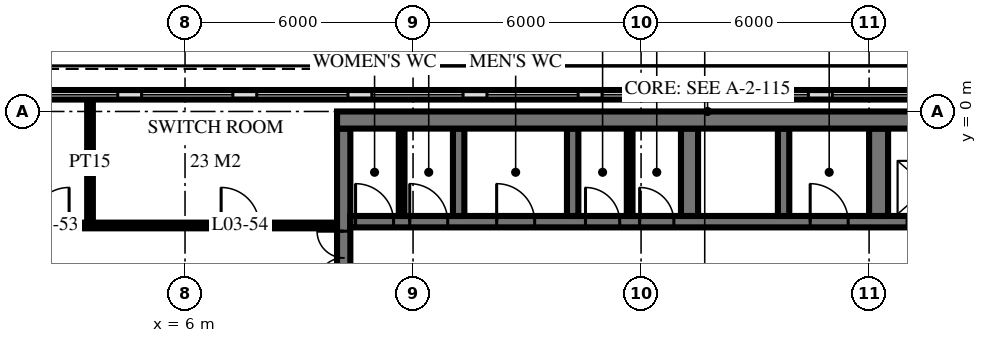
"""IFC4 building model, lengths in metres.
Left out: names, types, materials, properties, quantities, classifications, styles, units other than length and angle.
Written with IfcOpenShell. Run it as: python <this file> out.ifc"""

import sys

from ifc_helpers import new_model, si_unit, direction, frame, frame_2d, origin, place, context, subcontext, project, spatial, rectangle, extrude, element, fill, save


model = new_model("IFC4")
c1 = context("Model", 3, precision=1e-05, world=origin(), true_north=direction((0.0, 1.0)))
c2 = subcontext(c1, "Body", "Model", "MODEL_VIEW")
j1 = project(units=[si_unit("LENGTHUNIT", "METRE"), si_unit("PLANEANGLEUNIT", "RADIAN")], contexts=[c1])
p1 = place(None, origin())
s1 = spatial("IfcSite", under=j1, at=p1, CompositionType="ELEMENT")
p2 = place(p1, origin())
s2 = spatial("IfcBuilding", under=s1, at=p2, CompositionType="ELEMENT")
p3 = place(p2, frame((0.0, 0.0, 18.0)))
s3 = spatial("IfcBuildingStorey", under=s2, at=p3, CompositionType="ELEMENT", Elevation=18.0)
p4 = place(p3, frame((10.0, -0.225, 0.0), z_axis=(0.0, 0.0, 1.0), x_axis=(1.0, 0.0, 0.0)))
e1 = element("IfcWall", 1, at=p4, inside=s3, PredefinedType="SHEAR", context=c2, shape_type="SweptSolid", body=[
    extrude(rectangle(XDim=19.5, YDim=0.45, at=frame_2d((9.75, 0.0))), origin(), (0.0, 0.0, 1.0), 6.0),
])
p5 = place(p3, frame((10.175, -14.55, 0.0), z_axis=(0.0, 0.0, 1.0), x_axis=(0.0, 1.0, 0.0)))
e2 = element("IfcWall", 2, at=p5, inside=s3, PredefinedType="SHEAR", context=c2, shape_type="SweptSolid", body=[
    extrude(rectangle(XDim=14.1, YDim=0.35, at=frame_2d((7.05, 0.0))), origin(), (0.0, 0.0, 1.0), 6.0),
])
p6 = place(p5, frame((8.4, 0.0, 0.0)))
e3 = element("IfcOpeningElement", 3, at=p6, cuts=e2, PredefinedType="OPENING", context=c2, shape_type="SweptSolid", body=[
    extrude(rectangle(XDim=1.4, YDim=2.4, at=frame_2d((0.7, 1.2))), frame((0.0, 0.185, 0.0), z_axis=(0.0, -1.0, 0.0), x_axis=(1.0, 0.0, 0.0)), (0.0, 0.0, 1.0), 0.37),
])
p7 = place(p5, frame((10.0, 0.0, 0.0)))
e4 = element("IfcOpeningElement", 4, at=p7, cuts=e2, PredefinedType="OPENING", context=c2, shape_type="SweptSolid", body=[
    extrude(rectangle(XDim=1.4, YDim=2.4, at=frame_2d((0.7, 1.2))), frame((0.0, 0.185, 0.0), z_axis=(0.0, -1.0, 0.0), x_axis=(1.0, 0.0, 0.0)), (0.0, 0.0, 1.0), 0.37),
])
p8 = place(p5, frame((4.0, 0.0, 0.0)))
e5 = element("IfcOpeningElement", 5, at=p8, cuts=e2, PredefinedType="OPENING", context=c2, shape_type="SweptSolid", body=[
    extrude(rectangle(XDim=1.2, YDim=2.1, at=frame_2d((0.6, 1.05))), frame((0.0, 0.185, 0.0), z_axis=(0.0, -1.0, 0.0), x_axis=(1.0, 0.0, 0.0)), (0.0, 0.0, 1.0), 0.37),
])
p9 = place(p3, frame((10.35, -2.9, 0.0), z_axis=(0.0, 0.0, 1.0), x_axis=(1.0, 0.0, 0.0)))
e6 = element("IfcWall", 6, at=p9, inside=s3, PredefinedType="SHEAR", context=c2, shape_type="SweptSolid", body=[
    extrude(rectangle(XDim=18.7, YDim=0.3, at=frame_2d((9.35, 0.0))), origin(), (0.0, 0.0, 1.0), 6.0),
])
p10 = place(p9, frame((14.65, 0.0, 0.0)))
e7 = element("IfcOpeningElement", 7, at=p10, cuts=e6, PredefinedType="OPENING", context=c2, shape_type="SweptSolid", body=[
    extrude(rectangle(XDim=1.1, YDim=2.1, at=frame_2d((0.55, 1.05))), frame((0.0, 0.16, 0.0), z_axis=(0.0, -1.0, 0.0), x_axis=(1.0, 0.0, 0.0)), (0.0, 0.0, 1.0), 0.32),
])
p11 = place(p9, frame((17.05, 0.0, 0.0)))
e8 = element("IfcOpeningElement", 8, at=p11, cuts=e6, PredefinedType="OPENING", context=c2, shape_type="SweptSolid", body=[
    extrude(rectangle(XDim=1.1, YDim=2.1, at=frame_2d((0.55, 1.05))), frame((0.0, 0.16, 0.0), z_axis=(0.0, -1.0, 0.0), x_axis=(1.0, 0.0, 0.0)), (0.0, 0.0, 1.0), 0.32),
])
p12 = place(p9, frame((6.188, 0.0, 0.0)))
e9 = element("IfcOpeningElement", 9, at=p12, cuts=e6, PredefinedType="OPENING", context=c2, shape_type="SweptSolid", body=[
    extrude(rectangle(XDim=0.9, YDim=2.1, at=frame_2d((0.45, 1.05))), frame((0.0, 0.16, 0.0), z_axis=(0.0, -1.0, 0.0), x_axis=(1.0, 0.0, 0.0)), (0.0, 0.0, 1.0), 0.32),
])
p13 = place(p9, frame((7.613, 0.0, 0.0)))
e10 = element("IfcOpeningElement", 10, at=p13, cuts=e6, PredefinedType="OPENING", context=c2, shape_type="SweptSolid", body=[
    extrude(rectangle(XDim=0.9, YDim=2.1, at=frame_2d((0.45, 1.05))), frame((0.0, 0.16, 0.0), z_axis=(0.0, -1.0, 0.0), x_axis=(1.0, 0.0, 0.0)), (0.0, 0.0, 1.0), 0.32),
])
p14 = place(p9, frame((0.137, 0.0, 0.0)))
e11 = element("IfcOpeningElement", 11, at=p14, cuts=e6, PredefinedType="OPENING", context=c2, shape_type="SweptSolid", body=[
    extrude(rectangle(XDim=1.0, YDim=2.1, at=frame_2d((0.5, 1.05))), frame((0.0, 0.16, 0.0), z_axis=(0.0, -1.0, 0.0), x_axis=(1.0, 0.0, 0.0)), (0.0, 0.0, 1.0), 0.32),
])
p15 = place(p9, frame((1.562, 0.0, 0.0)))
e12 = element("IfcOpeningElement", 12, at=p15, cuts=e6, PredefinedType="OPENING", context=c2, shape_type="SweptSolid", body=[
    extrude(rectangle(XDim=1.0, YDim=2.1, at=frame_2d((0.5, 1.05))), frame((0.0, 0.16, 0.0), z_axis=(0.0, -1.0, 0.0), x_axis=(1.0, 0.0, 0.0)), (0.0, 0.0, 1.0), 0.32),
])
p16 = place(p9, frame((3.85, 0.0, 0.0)))
e13 = element("IfcOpeningElement", 13, at=p16, cuts=e6, PredefinedType="OPENING", context=c2, shape_type="SweptSolid", body=[
    extrude(rectangle(XDim=1.0, YDim=2.1, at=frame_2d((0.5, 1.05))), frame((0.0, 0.16, 0.0), z_axis=(0.0, -1.0, 0.0), x_axis=(1.0, 0.0, 0.0)), (0.0, 0.0, 1.0), 0.32),
])
p17 = place(p9, frame((12.1, 0.0, 0.0)))
e14 = element("IfcOpeningElement", 14, at=p17, cuts=e6, PredefinedType="OPENING", context=c2, shape_type="SweptSolid", body=[
    extrude(rectangle(XDim=1.0, YDim=2.1, at=frame_2d((0.5, 1.05))), frame((0.0, 0.16, 0.0), z_axis=(0.0, -1.0, 0.0), x_axis=(1.0, 0.0, 0.0)), (0.0, 0.0, 1.0), 0.32),
])
for number, where, z_axis, x_axis in (
    (15, (13.2, -2.75, 0.0), (0.0, 0.0, 1.0), (0.0, 1.0, 0.0)),
    (16, (16.2, -2.75, 0.0), (0.0, 0.0, 1.0), (0.0, 1.0, 0.0)),
):
    element("IfcWall", number, at=place(p3, frame(where, z_axis=z_axis, x_axis=x_axis)), inside=s3, PredefinedType="SHEAR", context=c2, shape_type="SweptSolid", body=[
        extrude(rectangle(XDim=2.3, YDim=0.3, at=frame_2d((1.15, 0.0))), origin(), (0.0, 0.0, 1.0), 6.0),
    ])
p18 = place(p3, frame((19.275, -2.75, 0.0), z_axis=(0.0, 0.0, 1.0), x_axis=(0.0, 1.0, 0.0)))
e17 = element("IfcWall", 17, at=p18, inside=s3, PredefinedType="SHEAR", context=c2, shape_type="SweptSolid", body=[
    extrude(rectangle(XDim=2.3, YDim=0.45, at=frame_2d((1.15, 0.0))), origin(), (0.0, 0.0, 1.0), 6.0),
])
p19 = place(p3, frame((21.75, -2.75, 0.0), z_axis=(0.0, 0.0, 1.0), x_axis=(0.0, 1.0, 0.0)))
e18 = element("IfcWall", 18, at=p19, inside=s3, PredefinedType="SHEAR", context=c2, shape_type="SweptSolid", body=[
    extrude(rectangle(XDim=2.3, YDim=0.3, at=frame_2d((1.15, 0.0))), origin(), (0.0, 0.0, 1.0), 6.0),
])
p20 = place(p3, frame((24.25, -2.75, 0.0), z_axis=(0.0, 0.0, 1.0), x_axis=(0.0, 1.0, 0.0)))
e19 = element("IfcWall", 19, at=p20, inside=s3, PredefinedType="SHEAR", context=c2, shape_type="SweptSolid", body=[
    extrude(rectangle(XDim=2.3, YDim=0.5, at=frame_2d((1.15, 0.0))), origin(), (0.0, 0.0, 1.0), 6.0),
])
p21 = place(p3, frame((28.713, 0.439, 0.0), z_axis=(0.0, 0.0, 1.0), x_axis=(-1.0, 0.0, 0.0)))
e20 = element("IfcWall", 20, at=p21, inside=s3, PredefinedType="SOLIDWALL", context=c2, shape_type="SweptSolid", body=[
    extrude(rectangle(XDim=57.426, YDim=0.25, at=frame_2d((28.713, 0.0))), origin(), (0.0, 0.0, 1.0), 5.72),
])
p22 = place(p21, frame((0.252, 0.0, 0.858)))
e21 = element("IfcOpeningElement", 21, at=p22, cuts=e20, PredefinedType="OPENING", context=c2, shape_type="SweptSolid", body=[
    extrude(rectangle(XDim=2.4, YDim=3.6, at=frame_2d((1.2, 1.8))), frame((0.0, 0.135, 0.0), z_axis=(0.0, -1.0, 0.0), x_axis=(1.0, 0.0, 0.0)), (0.0, 0.0, 1.0), 0.27),
])
p23 = place(p21, frame((3.281, 0.0, 0.858)))
e22 = element("IfcOpeningElement", 22, at=p23, cuts=e20, PredefinedType="OPENING", context=c2, shape_type="SweptSolid", body=[
    extrude(rectangle(XDim=2.4, YDim=3.6, at=frame_2d((1.2, 1.8))), frame((0.0, 0.135, 0.0), z_axis=(0.0, -1.0, 0.0), x_axis=(1.0, 0.0, 0.0)), (0.0, 0.0, 1.0), 0.27),
])
p24 = place(p21, frame((6.31, 0.0, 0.858)))
e23 = element("IfcOpeningElement", 23, at=p24, cuts=e20, PredefinedType="OPENING", context=c2, shape_type="SweptSolid", body=[
    extrude(rectangle(XDim=2.4, YDim=3.6, at=frame_2d((1.2, 1.8))), frame((0.0, 0.135, 0.0), z_axis=(0.0, -1.0, 0.0), x_axis=(1.0, 0.0, 0.0)), (0.0, 0.0, 1.0), 0.27),
])
p25 = place(p21, frame((9.339, 0.0, 0.858)))
e24 = element("IfcOpeningElement", 24, at=p25, cuts=e20, PredefinedType="OPENING", context=c2, shape_type="SweptSolid", body=[
    extrude(rectangle(XDim=2.4, YDim=3.6, at=frame_2d((1.2, 1.8))), frame((0.0, 0.135, 0.0), z_axis=(0.0, -1.0, 0.0), x_axis=(1.0, 0.0, 0.0)), (0.0, 0.0, 1.0), 0.27),
])
p26 = place(p21, frame((12.368, 0.0, 0.858)))
e25 = element("IfcOpeningElement", 25, at=p26, cuts=e20, PredefinedType="OPENING", context=c2, shape_type="SweptSolid", body=[
    extrude(rectangle(XDim=2.4, YDim=3.6, at=frame_2d((1.2, 1.8))), frame((0.0, 0.135, 0.0), z_axis=(0.0, -1.0, 0.0), x_axis=(1.0, 0.0, 0.0)), (0.0, 0.0, 1.0), 0.27),
])
p27 = place(p21, frame((15.397, 0.0, 0.858)))
e26 = element("IfcOpeningElement", 26, at=p27, cuts=e20, PredefinedType="OPENING", context=c2, shape_type="SweptSolid", body=[
    extrude(rectangle(XDim=2.4, YDim=3.6, at=frame_2d((1.2, 1.8))), frame((0.0, 0.135, 0.0), z_axis=(0.0, -1.0, 0.0), x_axis=(1.0, 0.0, 0.0)), (0.0, 0.0, 1.0), 0.27),
])
p28 = place(p21, frame((18.426, 0.0, 0.858)))
e27 = element("IfcOpeningElement", 27, at=p28, cuts=e20, PredefinedType="OPENING", context=c2, shape_type="SweptSolid", body=[
    extrude(rectangle(XDim=2.4, YDim=3.6, at=frame_2d((1.2, 1.8))), frame((0.0, 0.135, 0.0), z_axis=(0.0, -1.0, 0.0), x_axis=(1.0, 0.0, 0.0)), (0.0, 0.0, 1.0), 0.27),
])
p29 = place(p21, frame((21.455, 0.0, 0.858)))
e28 = element("IfcOpeningElement", 28, at=p29, cuts=e20, PredefinedType="OPENING", context=c2, shape_type="SweptSolid", body=[
    extrude(rectangle(XDim=2.4, YDim=3.6, at=frame_2d((1.2, 1.8))), frame((0.0, 0.135, 0.0), z_axis=(0.0, -1.0, 0.0), x_axis=(1.0, 0.0, 0.0)), (0.0, 0.0, 1.0), 0.27),
])
p30 = place(p21, frame((24.484, 0.0, 0.858)))
e29 = element("IfcOpeningElement", 29, at=p30, cuts=e20, PredefinedType="OPENING", context=c2, shape_type="SweptSolid", body=[
    extrude(rectangle(XDim=2.4, YDim=3.6, at=frame_2d((1.2, 1.8))), frame((0.0, 0.135, 0.0), z_axis=(0.0, -1.0, 0.0), x_axis=(1.0, 0.0, 0.0)), (0.0, 0.0, 1.0), 0.27),
])
p31 = place(p21, frame((27.513, 0.0, 0.858)))
e30 = element("IfcOpeningElement", 30, at=p31, cuts=e20, PredefinedType="OPENING", context=c2, shape_type="SweptSolid", body=[
    extrude(rectangle(XDim=2.4, YDim=3.6, at=frame_2d((1.2, 1.8))), frame((0.0, 0.135, 0.0), z_axis=(0.0, -1.0, 0.0), x_axis=(1.0, 0.0, 0.0)), (0.0, 0.0, 1.0), 0.27),
])
p32 = place(p21, frame((30.542, 0.0, 0.858)))
e31 = element("IfcOpeningElement", 31, at=p32, cuts=e20, PredefinedType="OPENING", context=c2, shape_type="SweptSolid", body=[
    extrude(rectangle(XDim=2.4, YDim=3.6, at=frame_2d((1.2, 1.8))), frame((0.0, 0.135, 0.0), z_axis=(0.0, -1.0, 0.0), x_axis=(1.0, 0.0, 0.0)), (0.0, 0.0, 1.0), 0.27),
])
p33 = place(p21, frame((33.571, 0.0, 0.858)))
e32 = element("IfcOpeningElement", 32, at=p33, cuts=e20, PredefinedType="OPENING", context=c2, shape_type="SweptSolid", body=[
    extrude(rectangle(XDim=2.4, YDim=3.6, at=frame_2d((1.2, 1.8))), frame((0.0, 0.135, 0.0), z_axis=(0.0, -1.0, 0.0), x_axis=(1.0, 0.0, 0.0)), (0.0, 0.0, 1.0), 0.27),
])
p34 = place(p21, frame((36.6, 0.0, 0.858)))
e33 = element("IfcOpeningElement", 33, at=p34, cuts=e20, PredefinedType="OPENING", context=c2, shape_type="SweptSolid", body=[
    extrude(rectangle(XDim=2.4, YDim=3.6, at=frame_2d((1.2, 1.8))), frame((0.0, 0.135, 0.0), z_axis=(0.0, -1.0, 0.0), x_axis=(1.0, 0.0, 0.0)), (0.0, 0.0, 1.0), 0.27),
])
p35 = place(p21, frame((39.629, 0.0, 0.858)))
e34 = element("IfcOpeningElement", 34, at=p35, cuts=e20, PredefinedType="OPENING", context=c2, shape_type="SweptSolid", body=[
    extrude(rectangle(XDim=2.4, YDim=3.6, at=frame_2d((1.2, 1.8))), frame((0.0, 0.135, 0.0), z_axis=(0.0, -1.0, 0.0), x_axis=(1.0, 0.0, 0.0)), (0.0, 0.0, 1.0), 0.27),
])
p36 = place(p21, frame((42.658, 0.0, 0.858)))
e35 = element("IfcOpeningElement", 35, at=p36, cuts=e20, PredefinedType="OPENING", context=c2, shape_type="SweptSolid", body=[
    extrude(rectangle(XDim=2.4, YDim=3.6, at=frame_2d((1.2, 1.8))), frame((0.0, 0.135, 0.0), z_axis=(0.0, -1.0, 0.0), x_axis=(1.0, 0.0, 0.0)), (0.0, 0.0, 1.0), 0.27),
])
p37 = place(p21, frame((45.687, 0.0, 0.858)))
e36 = element("IfcOpeningElement", 36, at=p37, cuts=e20, PredefinedType="OPENING", context=c2, shape_type="SweptSolid", body=[
    extrude(rectangle(XDim=2.4, YDim=3.6, at=frame_2d((1.2, 1.8))), frame((0.0, 0.135, 0.0), z_axis=(0.0, -1.0, 0.0), x_axis=(1.0, 0.0, 0.0)), (0.0, 0.0, 1.0), 0.27),
])
p38 = place(p21, frame((48.716, 0.0, 0.858)))
e37 = element("IfcOpeningElement", 37, at=p38, cuts=e20, PredefinedType="OPENING", context=c2, shape_type="SweptSolid", body=[
    extrude(rectangle(XDim=2.4, YDim=3.6, at=frame_2d((1.2, 1.8))), frame((0.0, 0.135, 0.0), z_axis=(0.0, -1.0, 0.0), x_axis=(1.0, 0.0, 0.0)), (0.0, 0.0, 1.0), 0.27),
])
p39 = place(p21, frame((51.745, 0.0, 0.858)))
e38 = element("IfcOpeningElement", 38, at=p39, cuts=e20, PredefinedType="OPENING", context=c2, shape_type="SweptSolid", body=[
    extrude(rectangle(XDim=2.4, YDim=3.6, at=frame_2d((1.2, 1.8))), frame((0.0, 0.135, 0.0), z_axis=(0.0, -1.0, 0.0), x_axis=(1.0, 0.0, 0.0)), (0.0, 0.0, 1.0), 0.27),
])
p40 = place(p21, frame((54.774, 0.0, 0.858)))
e39 = element("IfcOpeningElement", 39, at=p40, cuts=e20, PredefinedType="OPENING", context=c2, shape_type="SweptSolid", body=[
    extrude(rectangle(XDim=2.4, YDim=3.6, at=frame_2d((1.2, 1.8))), frame((0.0, 0.135, 0.0), z_axis=(0.0, -1.0, 0.0), x_axis=(1.0, 0.0, 0.0)), (0.0, 0.0, 1.0), 0.27),
])
for number, where, z_axis, x_axis in (
    (40, (17.7, -2.75, 0.0), (0.0, 0.0, 1.0), (0.0, 1.0, 0.0)),
    (41, (11.7, -2.75, 0.0), (0.0, 0.0, 1.0), (0.0, 1.0, 0.0)),
):
    element("IfcWall", number, at=place(p3, frame(where, z_axis=z_axis, x_axis=x_axis)), inside=s3, PredefinedType="PARTITIONING", context=c2, shape_type="SweptSolid", body=[
        extrude(rectangle(XDim=2.3, YDim=0.15, at=frame_2d((1.15, 0.0))), origin(), (0.0, 0.0, 1.0), 5.7),
    ])
p41 = place(p3, frame((3.5, -3.0, 0.0), z_axis=(0.0, 0.0, 1.0), x_axis=(0.0, 1.0, 0.0)))
e42 = element("IfcWall", 42, at=p41, inside=s3, PredefinedType="PARTITIONING", context=c2, shape_type="SweptSolid", body=[
    extrude(rectangle(XDim=3.312, YDim=0.15, at=frame_2d((1.656, 0.0))), origin(), (0.0, 0.0, 1.0), 5.55),
])
p42 = place(p3, frame((-9.95, -3.0, 0.0), z_axis=(0.0, 0.0, 1.0), x_axis=(1.0, 0.0, 0.0)))
e43 = element("IfcWall", 43, at=p42, inside=s3, PredefinedType="PARTITIONING", context=c2, shape_type="SweptSolid", body=[
    extrude(rectangle(XDim=19.9, YDim=0.15, at=frame_2d((9.95, 0.0))), origin(), (0.0, 0.0, 1.0), 5.55),
])
p43 = place(p42, frame((2.0, 0.0, 0.0)))
e44 = element("IfcOpeningElement", 44, at=p43, cuts=e43, PredefinedType="OPENING", context=c2, shape_type="SweptSolid", body=[
    extrude(rectangle(XDim=1.0, YDim=2.1, at=frame_2d((0.5, 1.05))), frame((0.0, 0.085, 0.0), z_axis=(0.0, -1.0, 0.0), x_axis=(1.0, 0.0, 0.0)), (0.0, 0.0, 1.0), 0.17),
])
p44 = place(p42, frame((11.9, 0.0, 0.0)))
e45 = element("IfcOpeningElement", 45, at=p44, cuts=e43, PredefinedType="OPENING", context=c2, shape_type="SweptSolid", body=[
    extrude(rectangle(XDim=1.0, YDim=2.1, at=frame_2d((0.5, 1.05))), frame((0.0, 0.085, 0.0), z_axis=(0.0, -1.0, 0.0), x_axis=(1.0, 0.0, 0.0)), (0.0, 0.0, 1.0), 0.17),
])
p45 = place(p42, frame((16.9, 0.0, 0.0)))
e46 = element("IfcOpeningElement", 46, at=p45, cuts=e43, PredefinedType="OPENING", context=c2, shape_type="SweptSolid", body=[
    extrude(rectangle(XDim=1.0, YDim=2.1, at=frame_2d((0.5, 1.05))), frame((0.0, 0.085, 0.0), z_axis=(0.0, -1.0, 0.0), x_axis=(1.0, 0.0, 0.0)), (0.0, 0.0, 1.0), 0.17),
])
p46 = place(p23, origin())
e47 = element("IfcWindow", 47, at=p46, inside=s3, PartitioningType="SINGLE_PANEL", PredefinedType="USERDEFINED", context=c2, shape_type="SweptSolid", body=[
    extrude(rectangle(XDim=2.4, YDim=3.6, at=frame_2d((1.2, 1.8))), frame((0.0, 0.125, 0.0), z_axis=(0.0, -1.0, 0.0), x_axis=(1.0, 0.0, 0.0)), (0.0, 0.0, 1.0), 0.06),
])
fill(e22, e47)
p47 = place(p24, origin())
e48 = element("IfcWindow", 48, at=p47, inside=s3, PartitioningType="SINGLE_PANEL", PredefinedType="USERDEFINED", context=c2, shape_type="SweptSolid", body=[
    extrude(rectangle(XDim=2.4, YDim=3.6, at=frame_2d((1.2, 1.8))), frame((0.0, 0.125, 0.0), z_axis=(0.0, -1.0, 0.0), x_axis=(1.0, 0.0, 0.0)), (0.0, 0.0, 1.0), 0.06),
])
fill(e23, e48)
p48 = place(p25, origin())
e49 = element("IfcWindow", 49, at=p48, inside=s3, PartitioningType="SINGLE_PANEL", PredefinedType="USERDEFINED", context=c2, shape_type="SweptSolid", body=[
    extrude(rectangle(XDim=2.4, YDim=3.6, at=frame_2d((1.2, 1.8))), frame((0.0, 0.125, 0.0), z_axis=(0.0, -1.0, 0.0), x_axis=(1.0, 0.0, 0.0)), (0.0, 0.0, 1.0), 0.06),
])
fill(e24, e49)
p49 = place(p26, origin())
e50 = element("IfcWindow", 50, at=p49, inside=s3, PartitioningType="SINGLE_PANEL", PredefinedType="USERDEFINED", context=c2, shape_type="SweptSolid", body=[
    extrude(rectangle(XDim=2.4, YDim=3.6, at=frame_2d((1.2, 1.8))), frame((0.0, 0.125, 0.0), z_axis=(0.0, -1.0, 0.0), x_axis=(1.0, 0.0, 0.0)), (0.0, 0.0, 1.0), 0.06),
])
fill(e25, e50)
p50 = place(p27, origin())
e51 = element("IfcWindow", 51, at=p50, inside=s3, PartitioningType="SINGLE_PANEL", PredefinedType="USERDEFINED", context=c2, shape_type="SweptSolid", body=[
    extrude(rectangle(XDim=2.4, YDim=3.6, at=frame_2d((1.2, 1.8))), frame((0.0, 0.125, 0.0), z_axis=(0.0, -1.0, 0.0), x_axis=(1.0, 0.0, 0.0)), (0.0, 0.0, 1.0), 0.06),
])
fill(e26, e51)
p51 = place(p28, origin())
e52 = element("IfcWindow", 52, at=p51, inside=s3, PartitioningType="SINGLE_PANEL", PredefinedType="USERDEFINED", context=c2, shape_type="SweptSolid", body=[
    extrude(rectangle(XDim=2.4, YDim=3.6, at=frame_2d((1.2, 1.8))), frame((0.0, 0.125, 0.0), z_axis=(0.0, -1.0, 0.0), x_axis=(1.0, 0.0, 0.0)), (0.0, 0.0, 1.0), 0.06),
])
fill(e27, e52)
p52 = place(p29, origin())
e53 = element("IfcWindow", 53, at=p52, inside=s3, PartitioningType="SINGLE_PANEL", PredefinedType="USERDEFINED", context=c2, shape_type="SweptSolid", body=[
    extrude(rectangle(XDim=2.4, YDim=3.6, at=frame_2d((1.2, 1.8))), frame((0.0, 0.125, 0.0), z_axis=(0.0, -1.0, 0.0), x_axis=(1.0, 0.0, 0.0)), (0.0, 0.0, 1.0), 0.06),
])
fill(e28, e53)
p53 = place(p30, origin())
e54 = element("IfcWindow", 54, at=p53, inside=s3, PartitioningType="SINGLE_PANEL", PredefinedType="USERDEFINED", context=c2, shape_type="SweptSolid", body=[
    extrude(rectangle(XDim=2.4, YDim=3.6, at=frame_2d((1.2, 1.8))), frame((0.0, 0.125, 0.0), z_axis=(0.0, -1.0, 0.0), x_axis=(1.0, 0.0, 0.0)), (0.0, 0.0, 1.0), 0.06),
])
fill(e29, e54)
p54 = place(p7, origin())
e55 = element("IfcDoor", 55, at=p54, inside=s3, OperationType="DOUBLE_DOOR_SINGLE_SWING", PredefinedType="DOOR", context=c2, shape_type="SweptSolid", body=[
    extrude(rectangle(XDim=1.4, YDim=2.4, at=frame_2d((0.7, 1.2))), frame((0.0, 0.025, 0.0), z_axis=(0.0, -1.0, 0.0), x_axis=(1.0, 0.0, 0.0)), (0.0, 0.0, 1.0), 0.05),
])
fill(e4, e55)
p55 = place(p12, origin())
e56 = element("IfcDoor", 56, at=p55, inside=s3, OperationType="SINGLE_SWING_RIGHT", PredefinedType="DOOR", context=c2, shape_type="SweptSolid", body=[
    extrude(rectangle(XDim=0.9, YDim=2.1, at=frame_2d((0.45, 1.05))), frame((0.0, 0.025, 0.0), z_axis=(0.0, -1.0, 0.0), x_axis=(1.0, 0.0, 0.0)), (0.0, 0.0, 1.0), 0.05),
])
fill(e9, e56)
p56 = place(p13, origin())
e57 = element("IfcDoor", 57, at=p56, inside=s3, OperationType="SINGLE_SWING_RIGHT", PredefinedType="DOOR", context=c2, shape_type="SweptSolid", body=[
    extrude(rectangle(XDim=0.9, YDim=2.1, at=frame_2d((0.45, 1.05))), frame((0.0, 0.025, 0.0), z_axis=(0.0, -1.0, 0.0), x_axis=(1.0, 0.0, 0.0)), (0.0, 0.0, 1.0), 0.05),
])
fill(e10, e57)
p57 = place(p14, origin())
e58 = element("IfcDoor", 58, at=p57, inside=s3, OperationType="SINGLE_SWING_RIGHT", PredefinedType="DOOR", context=c2, shape_type="SweptSolid", body=[
    extrude(rectangle(XDim=1.0, YDim=2.1, at=frame_2d((0.5, 1.05))), frame((0.0, 0.025, 0.0), z_axis=(0.0, -1.0, 0.0), x_axis=(1.0, 0.0, 0.0)), (0.0, 0.0, 1.0), 0.05),
])
fill(e11, e58)
p58 = place(p15, origin())
e59 = element("IfcDoor", 59, at=p58, inside=s3, OperationType="SINGLE_SWING_RIGHT", PredefinedType="DOOR", context=c2, shape_type="SweptSolid", body=[
    extrude(rectangle(XDim=1.0, YDim=2.1, at=frame_2d((0.5, 1.05))), frame((0.0, 0.025, 0.0), z_axis=(0.0, -1.0, 0.0), x_axis=(1.0, 0.0, 0.0)), (0.0, 0.0, 1.0), 0.05),
])
fill(e12, e59)
p59 = place(p16, origin())
e60 = element("IfcDoor", 60, at=p59, inside=s3, OperationType="SINGLE_SWING_RIGHT", PredefinedType="DOOR", context=c2, shape_type="SweptSolid", body=[
    extrude(rectangle(XDim=1.0, YDim=2.1, at=frame_2d((0.5, 1.05))), frame((0.0, 0.025, 0.0), z_axis=(0.0, -1.0, 0.0), x_axis=(1.0, 0.0, 0.0)), (0.0, 0.0, 1.0), 0.05),
])
fill(e13, e60)
p60 = place(p17, origin())
e61 = element("IfcDoor", 61, at=p60, inside=s3, OperationType="SINGLE_SWING_RIGHT", PredefinedType="DOOR", context=c2, shape_type="SweptSolid", body=[
    extrude(rectangle(XDim=1.0, YDim=2.1, at=frame_2d((0.5, 1.05))), frame((0.0, 0.025, 0.0), z_axis=(0.0, -1.0, 0.0), x_axis=(1.0, 0.0, 0.0)), (0.0, 0.0, 1.0), 0.05),
])
fill(e14, e61)
p61 = place(p44, origin())
e62 = element("IfcDoor", 62, at=p61, inside=s3, OperationType="SINGLE_SWING_LEFT", PredefinedType="DOOR", context=c2, shape_type="SweptSolid", body=[
    extrude(rectangle(XDim=1.0, YDim=2.1, at=frame_2d((0.5, 1.05))), frame((0.0, 0.025, 0.0), z_axis=(0.0, -1.0, 0.0), x_axis=(1.0, 0.0, 0.0)), (0.0, 0.0, 1.0), 0.05),
])
fill(e45, e62)
p62 = place(p45, origin())
e63 = element("IfcDoor", 63, at=p62, inside=s3, OperationType="SINGLE_SWING_RIGHT", PredefinedType="DOOR", context=c2, shape_type="SweptSolid", body=[
    extrude(rectangle(XDim=1.0, YDim=2.1, at=frame_2d((0.5, 1.05))), frame((0.0, 0.025, 0.0), z_axis=(0.0, -1.0, 0.0), x_axis=(1.0, 0.0, 0.0)), (0.0, 0.0, 1.0), 0.05),
])
fill(e46, e63)
save(model, sys.argv[1])
